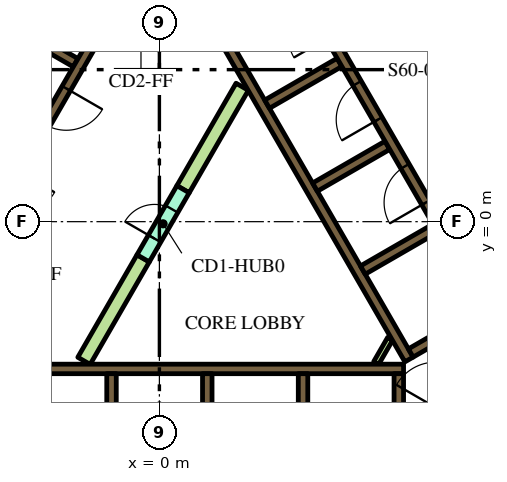
"""IFC4 building model, lengths in metres.
Left out: names, types, materials, properties, quantities, classifications, styles, units other than length and angle.
Written with IfcOpenShell. Run it as: python <this file> out.ifc"""

import sys

from ifc_helpers import new_model, si_unit, direction, frame, frame_2d, origin, place, context, subcontext, project, spatial, polyline, rectangle, outline, extrude, element, fill, save


model = new_model("IFC4")
c1 = context("Model", 3, precision=1e-05, world=origin(), true_north=direction((0.0, 1.0)))
c2 = subcontext(c1, "Body", "Model", "MODEL_VIEW")
j1 = project(units=[si_unit("LENGTHUNIT", "METRE"), si_unit("PLANEANGLEUNIT", "RADIAN")], contexts=[c1])
p1 = place(None, origin())
s1 = spatial("IfcSite", under=j1, at=p1, CompositionType="ELEMENT")
p2 = place(p1, origin())
s2 = spatial("IfcBuilding", under=s1, at=p2, CompositionType="ELEMENT")
p3 = place(p2, frame((0.0, 0.0, 256.2)))
s3 = spatial("IfcBuildingStorey", under=s2, at=p3, CompositionType="ELEMENT", Elevation=256.2)
p4 = place(p3, frame((-5.545, -3.875, 0.0), z_axis=(0.0, 0.0, 1.0), x_axis=(1.0, 0.0, 0.0)))
e1 = element("IfcWall", 1, at=p4, inside=s3, PredefinedType="SOLIDWALL", context=c2, shape_type="SweptSolid", body=[
    extrude(rectangle(XDim=11.97, YDim=0.25, at=frame_2d((5.985, 0.0))), origin(), (0.0, 0.0, 1.0), 5.4),
])
p5 = place(p3, frame((6.3, -7.24, 0.0), z_axis=(0.0, 0.0, 1.0), x_axis=(0.0, 1.0, 0.0)))
e2 = element("IfcWall", 2, at=p5, inside=s3, PredefinedType="SOLIDWALL", context=c2, shape_type="SweptSolid", body=[
    extrude(rectangle(XDim=3.24, YDim=0.25, at=frame_2d((1.62, 0.0))), origin(), (0.0, 0.0, 1.0), 5.4),
])
for number, where, z_axis, x_axis in (
    (3, (3.78, -4.0, 0.0), (0.0, 0.0, 1.0), (0.0, -1.0, 0.0)),
    (4, (1.26, -4.0, 0.0), (0.0, 0.0, 1.0), (0.0, -1.0, 0.0)),
    (5, (-1.26, -4.0, 0.0), (0.0, 0.0, 1.0), (0.0, -1.0, 0.0)),
):
    element("IfcWall", number, at=place(p3, frame(where, z_axis=z_axis, x_axis=x_axis)), inside=s3, PredefinedType="SOLIDWALL", context=c2, shape_type="SweptSolid", body=[
        extrude(rectangle(XDim=2.2, YDim=0.25, at=frame_2d((1.1, 0.0))), origin(), (0.0, 0.0, 1.0), 5.4),
    ])
p6 = place(p3, frame((6.568, -3.627, 0.0), z_axis=(0.0, 0.0, 1.0), x_axis=(-0.499999455981, 0.866025717874, 0.0)))
e6 = element("IfcWall", 6, at=p6, inside=s3, PredefinedType="SOLIDWALL", context=c2, shape_type="SweptSolid", body=[
    extrude(rectangle(XDim=11.978, YDim=0.25, at=frame_2d((5.989, 0.0))), origin(), (0.0, 0.0, 1.0), 5.4),
])
for number, where, z_axis, x_axis in (
    (7, (2.834, 3.091, 0.0), (0.0, 0.0, 1.0), (0.866, 0.5, 0.0)),
    (8, (4.094, 0.909, 0.0), (0.0, 0.0, 1.0), (0.866, 0.5, 0.0)),
    (9, (5.354, -1.274, 0.0), (0.0, 0.0, 1.0), (0.866, 0.5, 0.0)),
):
    element("IfcWall", number, at=place(p3, frame(where, z_axis=z_axis, x_axis=x_axis)), inside=s3, PredefinedType="SOLIDWALL", context=c2, shape_type="SweptSolid", body=[
        extrude(rectangle(XDim=2.2, YDim=0.25, at=frame_2d((1.1, 0.0))), origin(), (0.0, 0.0, 1.0), 5.4),
    ])
p7 = place(p3, frame((6.614, -3.456, 0.0), z_axis=(0.0, 0.0, 1.0), x_axis=(0.866032512851, 0.499987686533, 0.0)))
e10 = element("IfcWall", 10, at=p7, inside=s3, PredefinedType="SOLIDWALL", context=c2, shape_type="SweptSolid", body=[
    extrude(rectangle(XDim=2.975, YDim=0.25, at=frame_2d((1.487, 0.0))), origin(), (0.0, 0.0, 1.0), 5.4),
])
p8 = place(p3, frame((-8.06, -1.311, 0.0), z_axis=(0.0, 0.0, 1.0), x_axis=(0.50000273126, 0.866023826885, 0.0)))
e11 = element("IfcWall", 11, at=p8, inside=s3, PredefinedType="SOLIDWALL", context=c2, shape_type="SweptSolid", body=[
    extrude(rectangle(XDim=10.33, YDim=0.25, at=frame_2d((5.165, 0.0))), origin(), (0.0, 0.0, 1.0), 5.4),
])
p9 = place(p3, frame((-2.204, 4.182, 0.0), z_axis=(0.0, 0.0, 1.0), x_axis=(-0.866008176907, 0.50002983664, 0.0)))
e12 = element("IfcWall", 12, at=p9, inside=s3, PredefinedType="SOLIDWALL", context=c2, shape_type="SweptSolid", body=[
    extrude(rectangle(XDim=2.2, YDim=0.25, at=frame_2d((1.1, 0.0))), origin(), (0.0, 0.0, 1.0), 5.4),
])
p10 = place(p3, frame((5.705, -3.718, 0.0), z_axis=(0.0, 0.0, 1.0), x_axis=(0.499962090823, 0.866047289552, 0.0)))
e13 = element("IfcWall", 13, at=p10, inside=s3, PredefinedType="PARTITIONING", context=c2, shape_type="SweptSolid", body=[
    extrude(rectangle(XDim=0.735, YDim=0.15, at=frame_2d((0.367, 0.0))), origin(), (0.0, 0.0, 1.0), 4.3),
])
p11 = place(p3, origin())
e14 = element("IfcWall", 14, at=p11, inside=s3, PredefinedType="PARTITIONING", context=c2, shape_type="SweptSolid", body=[
    extrude(outline(polyline([(2.017, 3.643), (2.342, 3.456), (0.785, 0.76), (0.46, 0.947), (2.017, 3.643)])), origin(), (0.0, 0.0, 1.0), 4.3),
])
e15 = element("IfcWall", 15, at=p11, inside=s3, PredefinedType="PARTITIONING", context=c2, shape_type="SweptSolid", body=[
    extrude(outline(polyline([(-0.59, -0.872), (-0.265, -1.059), (-1.822, -3.756), (-2.147, -3.568), (-0.59, -0.872)])), origin(), (0.0, 0.0, 1.0), 4.3),
])
p12 = place(p3, frame((8.565, -2.185, 0.0), z_axis=(0.0, 0.0, 1.0), x_axis=(-0.499997954832, 0.866026584559, 0.0)))
e16 = element("IfcWall", 16, at=p12, inside=s3, PredefinedType="SOLIDWALL", context=c2, shape_type="SweptSolid", body=[
    extrude(rectangle(XDim=12.35, YDim=0.25, at=frame_2d((6.175, 0.0))), origin(), (0.0, 0.0, 1.0), 5.4),
])
p13 = place(p12, frame((0.585, 0.0, 0.0)))
e17 = element("IfcOpeningElement", 17, at=p13, cuts=e16, PredefinedType="OPENING", context=c2, shape_type="SweptSolid", body=[
    extrude(rectangle(XDim=1.1, YDim=2.1, at=frame_2d((0.55, 1.05))), frame((0.0, 0.135, 0.0), z_axis=(0.0, -1.0, 0.0), x_axis=(1.0, 0.0, 0.0)), (0.0, 0.0, 1.0), 0.27),
])
p14 = place(p12, frame((3.105, 0.0, 0.0)))
e18 = element("IfcOpeningElement", 18, at=p14, cuts=e16, PredefinedType="OPENING", context=c2, shape_type="SweptSolid", body=[
    extrude(rectangle(XDim=1.1, YDim=2.1, at=frame_2d((0.55, 1.05))), frame((0.0, 0.135, 0.0), z_axis=(0.0, -1.0, 0.0), x_axis=(1.0, 0.0, 0.0)), (0.0, 0.0, 1.0), 0.27),
])
p15 = place(p12, frame((5.625, 0.0, 0.0)))
e19 = element("IfcOpeningElement", 19, at=p15, cuts=e16, PredefinedType="OPENING", context=c2, shape_type="SweptSolid", body=[
    extrude(rectangle(XDim=1.1, YDim=2.1, at=frame_2d((0.55, 1.05))), frame((0.0, 0.135, 0.0), z_axis=(0.0, -1.0, 0.0), x_axis=(1.0, 0.0, 0.0)), (0.0, 0.0, 1.0), 0.27),
])
p16 = place(p12, frame((8.145, 0.0, 0.0)))
e20 = element("IfcOpeningElement", 20, at=p16, cuts=e16, PredefinedType="OPENING", context=c2, shape_type="SweptSolid", body=[
    extrude(rectangle(XDim=1.1, YDim=2.1, at=frame_2d((0.55, 1.05))), frame((0.0, 0.135, 0.0), z_axis=(0.0, -1.0, 0.0), x_axis=(1.0, 0.0, 0.0)), (0.0, 0.0, 1.0), 0.27),
])
p17 = place(p12, frame((10.665, 0.0, 0.0)))
e21 = element("IfcOpeningElement", 21, at=p17, cuts=e16, PredefinedType="OPENING", context=c2, shape_type="SweptSolid", body=[
    extrude(rectangle(XDim=1.1, YDim=2.1, at=frame_2d((0.55, 1.05))), frame((0.0, 0.135, 0.0), z_axis=(0.0, -1.0, 0.0), x_axis=(1.0, 0.0, 0.0)), (0.0, 0.0, 1.0), 0.27),
])
p18 = place(p3, frame((-0.898, 6.194, 0.0), z_axis=(0.0, 0.0, 1.0), x_axis=(-0.499996202215, -0.866027596426, 0.0)))
e22 = element("IfcWall", 22, at=p18, inside=s3, PredefinedType="SOLIDWALL", context=c2, shape_type="SweptSolid", body=[
    extrude(rectangle(XDim=9.83, YDim=0.25, at=frame_2d((4.915, 0.0))), origin(), (0.0, 0.0, 1.0), 5.4),
])
p19 = place(p18, frame((0.585, 0.0, 0.0)))
e23 = element("IfcOpeningElement", 23, at=p19, cuts=e22, PredefinedType="OPENING", context=c2, shape_type="SweptSolid", body=[
    extrude(rectangle(XDim=1.1, YDim=2.1, at=frame_2d((0.55, 1.05))), frame((0.0, 0.135, 0.0), z_axis=(0.0, -1.0, 0.0), x_axis=(1.0, 0.0, 0.0)), (0.0, 0.0, 1.0), 0.27),
])
p20 = place(p18, frame((3.105, 0.0, 0.0)))
e24 = element("IfcOpeningElement", 24, at=p20, cuts=e22, PredefinedType="OPENING", context=c2, shape_type="SweptSolid", body=[
    extrude(rectangle(XDim=1.1, YDim=2.1, at=frame_2d((0.55, 1.05))), frame((0.0, 0.135, 0.0), z_axis=(0.0, -1.0, 0.0), x_axis=(1.0, 0.0, 0.0)), (0.0, 0.0, 1.0), 0.27),
])
p21 = place(p18, frame((5.625, 0.0, 0.0)))
e25 = element("IfcOpeningElement", 25, at=p21, cuts=e22, PredefinedType="OPENING", context=c2, shape_type="SweptSolid", body=[
    extrude(rectangle(XDim=1.1, YDim=2.1, at=frame_2d((0.55, 1.05))), frame((0.0, 0.135, 0.0), z_axis=(0.0, -1.0, 0.0), x_axis=(1.0, 0.0, 0.0)), (0.0, 0.0, 1.0), 0.27),
])
p22 = place(p18, frame((8.145, 0.0, 0.0)))
e26 = element("IfcOpeningElement", 26, at=p22, cuts=e22, PredefinedType="OPENING", context=c2, shape_type="SweptSolid", body=[
    extrude(rectangle(XDim=1.1, YDim=2.1, at=frame_2d((0.55, 1.05))), frame((0.0, 0.135, 0.0), z_axis=(0.0, -1.0, 0.0), x_axis=(1.0, 0.0, 0.0)), (0.0, 0.0, 1.0), 0.27),
])
p23 = place(p3, frame((7.053, -5.284, 0.0), z_axis=(0.0, 0.0, 1.0), x_axis=(0.500078061341, 0.865980330357, 0.0)))
e27 = element("IfcWall", 27, at=p23, inside=s3, PredefinedType="SOLIDWALL", context=c2, shape_type="SweptSolid", body=[
    extrude(rectangle(XDim=2.1, YDim=0.4, at=frame_2d((1.05, 0.0))), origin(), (0.0, 0.0, 1.0), 5.4),
])
p24 = place(p23, frame((0.45, 0.0, 0.0)))
e28 = element("IfcOpeningElement", 28, at=p24, cuts=e27, PredefinedType="OPENING", context=c2, shape_type="SweptSolid", body=[
    extrude(rectangle(XDim=1.2, YDim=2.1, at=frame_2d((0.6, 1.05))), frame((0.0, 0.21, 0.0), z_axis=(0.0, -1.0, 0.0), x_axis=(1.0, 0.0, 0.0)), (0.0, 0.0, 1.0), 0.42),
])
p25 = place(p3, frame((-0.427, -0.966, 0.0), z_axis=(0.0, 0.0, 1.0), x_axis=(0.49994051562, 0.866059744384, 0.0)))
e29 = element("IfcWall", 29, at=p25, inside=s3, PredefinedType="PARTITIONING", context=c2, shape_type="SweptSolid", body=[
    extrude(rectangle(XDim=2.1, YDim=0.375, at=frame_2d((1.05, 0.0))), origin(), (0.0, 0.0, 1.0), 4.3),
])
p26 = place(p25, frame((0.6, 0.0, 0.0)))
e30 = element("IfcOpeningElement", 30, at=p26, cuts=e29, PredefinedType="OPENING", context=c2, shape_type="SweptSolid", body=[
    extrude(rectangle(XDim=0.9, YDim=2.1, at=frame_2d((0.45, 1.05))), frame((0.0, 0.198, 0.0), z_axis=(0.0, -1.0, 0.0), x_axis=(1.0, 0.0, 0.0)), (0.0, 0.0, 1.0), 0.395),
])
p27 = place(p3, frame((14.833, -1.99, 0.0), z_axis=(0.0, 0.0, 1.0), x_axis=(-0.500002996416, 0.866023673796, 0.0)))
e31 = element("IfcWall", 31, at=p27, inside=s3, PredefinedType="PARTITIONING", context=c2, shape_type="SweptSolid", body=[
    extrude(rectangle(XDim=18.28, YDim=0.2, at=frame_2d((9.14, 0.0))), origin(), (0.0, 0.0, 1.0), 4.3),
])
p28 = place(p27, frame((8.54, 0.0, 0.0)))
e32 = element("IfcOpeningElement", 32, at=p28, cuts=e31, PredefinedType="OPENING", context=c2, shape_type="SweptSolid", body=[
    extrude(rectangle(XDim=1.2, YDim=2.1, at=frame_2d((0.6, 1.05))), frame((0.0, 0.11, 0.0), z_axis=(0.0, -1.0, 0.0), x_axis=(1.0, 0.0, 0.0)), (0.0, 0.0, 1.0), 0.22),
])
p29 = place(p14, origin())
e33 = element("IfcDoor", 33, at=p29, inside=s3, OperationType="DOUBLE_DOOR_SLIDING", PredefinedType="DOOR", context=c2, shape_type="SweptSolid", body=[
    extrude(rectangle(XDim=1.1, YDim=2.1, at=frame_2d((0.55, 1.05))), frame((0.0, 0.025, 0.0), z_axis=(0.0, -1.0, 0.0), x_axis=(1.0, 0.0, 0.0)), (0.0, 0.0, 1.0), 0.05),
])
fill(e18, e33)
p30 = place(p15, origin())
e34 = element("IfcDoor", 34, at=p30, inside=s3, OperationType="DOUBLE_DOOR_SLIDING", PredefinedType="DOOR", context=c2, shape_type="SweptSolid", body=[
    extrude(rectangle(XDim=1.1, YDim=2.1, at=frame_2d((0.55, 1.05))), frame((0.0, 0.025, 0.0), z_axis=(0.0, -1.0, 0.0), x_axis=(1.0, 0.0, 0.0)), (0.0, 0.0, 1.0), 0.05),
])
fill(e19, e34)
p31 = place(p20, origin())
e35 = element("IfcDoor", 35, at=p31, inside=s3, OperationType="DOUBLE_DOOR_SLIDING", PredefinedType="DOOR", context=c2, shape_type="SweptSolid", body=[
    extrude(rectangle(XDim=1.1, YDim=2.1, at=frame_2d((0.55, 1.05))), frame((0.0, 0.025, 0.0), z_axis=(0.0, -1.0, 0.0), x_axis=(1.0, 0.0, 0.0)), (0.0, 0.0, 1.0), 0.05),
])
fill(e24, e35)
p32 = place(p26, origin())
e36 = element("IfcDoor", 36, at=p32, inside=s3, OperationType="SINGLE_SWING_LEFT", PredefinedType="DOOR", context=c2, shape_type="SweptSolid", body=[
    extrude(rectangle(XDim=0.9, YDim=2.1, at=frame_2d((0.45, 1.05))), frame((0.0, 0.025, 0.0), z_axis=(0.0, -1.0, 0.0), x_axis=(1.0, 0.0, 0.0)), (0.0, 0.0, 1.0), 0.05),
])
fill(e30, e36)
save(model, sys.argv[1])
